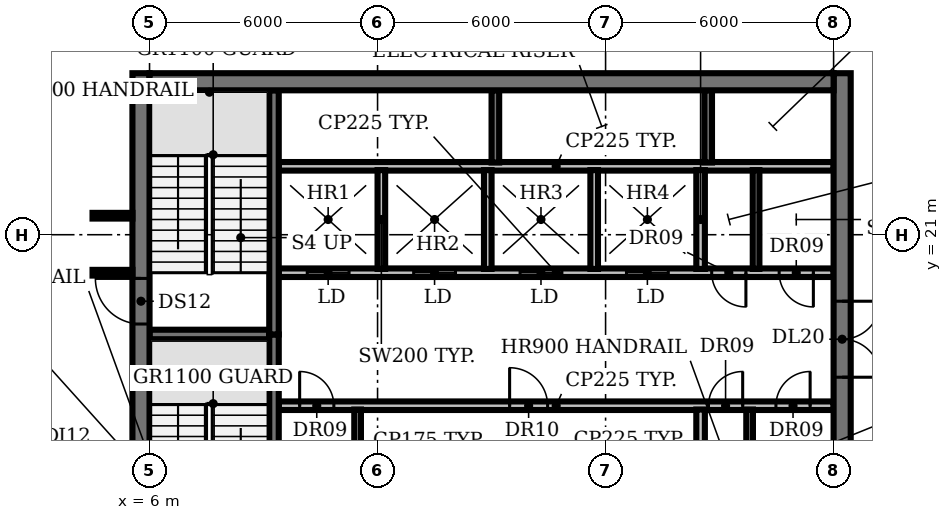
"""IFC4 building model, lengths in metres.
Left out: names, types, materials, properties, quantities, classifications, styles, units other than length and angle.
Written with IfcOpenShell. Run it as: python <this file> out.ifc"""

import sys

from ifc_helpers import new_model, si_unit, direction, frame, frame_2d, origin, place, context, subcontext, project, spatial, rectangle, extrude, element, fill, save


model = new_model("IFC4")
c1 = context("Model", 3, precision=1e-05, world=origin(), true_north=direction((0.0, 1.0)))
c2 = subcontext(c1, "Body", "Model", "MODEL_VIEW")
j1 = project(units=[si_unit("LENGTHUNIT", "METRE"), si_unit("PLANEANGLEUNIT", "RADIAN")], contexts=[c1])
p1 = place(None, origin())
s1 = spatial("IfcSite", under=j1, at=p1, CompositionType="ELEMENT")
p2 = place(p1, origin())
s2 = spatial("IfcBuilding", under=s1, at=p2, CompositionType="ELEMENT")
p3 = place(p2, frame((0.0, 0.0, 213.8)))
s3 = spatial("IfcBuildingStorey", under=s2, at=p3, CompositionType="ELEMENT", Elevation=213.8)
p4 = place(p3, frame((9.4, 16.5, 0.0), z_axis=(0.0, 0.0, 1.0), x_axis=(1.0, 0.0, 0.0)))
e1 = element("IfcWall", 1, at=p4, inside=s3, PredefinedType="PARTITIONING", context=c2, shape_type="SweptSolid", body=[
    extrude(rectangle(XDim=14.6, YDim=0.225, at=frame_2d((7.3, 0.0))), origin(), (0.0, 0.0, 1.0), 3.85),
])
p5 = place(p4, frame((0.55, 0.0, 0.0)))
e2 = element("IfcOpeningElement", 2, at=p5, cuts=e1, PredefinedType="OPENING", context=c2, shape_type="SweptSolid", body=[
    extrude(rectangle(XDim=0.9, YDim=2.1, at=frame_2d((0.45, 1.05))), frame((0.0, 0.123, 0.0), z_axis=(0.0, -1.0, 0.0), x_axis=(1.0, 0.0, 0.0)), (0.0, 0.0, 1.0), 0.245),
])
p6 = place(p4, frame((6.075, 0.0, 0.0)))
e3 = element("IfcOpeningElement", 3, at=p6, cuts=e1, PredefinedType="OPENING", context=c2, shape_type="SweptSolid", body=[
    extrude(rectangle(XDim=1.0, YDim=2.1, at=frame_2d((0.5, 1.05))), frame((0.0, 0.123, 0.0), z_axis=(0.0, -1.0, 0.0), x_axis=(1.0, 0.0, 0.0)), (0.0, 0.0, 1.0), 0.245),
])
p7 = place(p4, frame((11.308, 0.0, 0.0)))
e4 = element("IfcOpeningElement", 4, at=p7, cuts=e1, PredefinedType="OPENING", context=c2, shape_type="SweptSolid", body=[
    extrude(rectangle(XDim=0.9, YDim=2.1, at=frame_2d((0.45, 1.05))), frame((0.0, 0.123, 0.0), z_axis=(0.0, -1.0, 0.0), x_axis=(1.0, 0.0, 0.0)), (0.0, 0.0, 1.0), 0.245),
])
p8 = place(p4, frame((13.083, 0.0, 0.0)))
e5 = element("IfcOpeningElement", 5, at=p8, cuts=e1, PredefinedType="OPENING", context=c2, shape_type="SweptSolid", body=[
    extrude(rectangle(XDim=0.9, YDim=2.1, at=frame_2d((0.45, 1.05))), frame((0.0, 0.123, 0.0), z_axis=(0.0, -1.0, 0.0), x_axis=(1.0, 0.0, 0.0)), (0.0, 0.0, 1.0), 0.245),
])
p9 = place(p3, frame((6.0, 18.375, 0.0), z_axis=(0.0, 0.0, 1.0), x_axis=(1.0, 0.0, 0.0)))
e6 = element("IfcWall", 6, at=p9, inside=s3, PredefinedType="SHEAR", context=c2, shape_type="SweptSolid", body=[
    extrude(rectangle(XDim=3.15, YDim=0.25, at=frame_2d((1.575, 0.0))), origin(), (0.0, 0.0, 1.0), 3.85),
])
p10 = place(p3, frame((24.0, 20.0, 0.0), z_axis=(0.0, 0.0, 1.0), x_axis=(-1.0, 0.0, 0.0)))
e7 = element("IfcWall", 7, at=p10, inside=s3, PredefinedType="PARTITIONING", context=c2, shape_type="SweptSolid", body=[
    extrude(rectangle(XDim=14.6, YDim=0.225, at=frame_2d((7.3, 0.0))), origin(), (0.0, 0.0, 1.0), 3.85),
])
p11 = place(p10, frame((12.75, 0.0, 0.0)))
e8 = element("IfcOpeningElement", 8, at=p11, cuts=e7, PredefinedType="OPENING", context=c2, shape_type="SweptSolid", body=[
    extrude(rectangle(XDim=1.1, YDim=2.1, at=frame_2d((0.55, 1.05))), frame((0.0, 0.123, 0.0), z_axis=(0.0, -1.0, 0.0), x_axis=(1.0, 0.0, 0.0)), (0.0, 0.0, 1.0), 0.245),
])
p12 = place(p10, frame((9.95, 0.0, 0.0)))
e9 = element("IfcOpeningElement", 9, at=p12, cuts=e7, PredefinedType="OPENING", context=c2, shape_type="SweptSolid", body=[
    extrude(rectangle(XDim=1.1, YDim=2.1, at=frame_2d((0.55, 1.05))), frame((0.0, 0.123, 0.0), z_axis=(0.0, -1.0, 0.0), x_axis=(1.0, 0.0, 0.0)), (0.0, 0.0, 1.0), 0.245),
])
p13 = place(p10, frame((7.15, 0.0, 0.0)))
e10 = element("IfcOpeningElement", 10, at=p13, cuts=e7, PredefinedType="OPENING", context=c2, shape_type="SweptSolid", body=[
    extrude(rectangle(XDim=1.1, YDim=2.1, at=frame_2d((0.55, 1.05))), frame((0.0, 0.123, 0.0), z_axis=(0.0, -1.0, 0.0), x_axis=(1.0, 0.0, 0.0)), (0.0, 0.0, 1.0), 0.245),
])
p14 = place(p10, frame((4.35, 0.0, 0.0)))
e11 = element("IfcOpeningElement", 11, at=p14, cuts=e7, PredefinedType="OPENING", context=c2, shape_type="SweptSolid", body=[
    extrude(rectangle(XDim=1.1, YDim=2.1, at=frame_2d((0.55, 1.05))), frame((0.0, 0.123, 0.0), z_axis=(0.0, -1.0, 0.0), x_axis=(1.0, 0.0, 0.0)), (0.0, 0.0, 1.0), 0.245),
])
p15 = place(p10, frame((2.308, 0.0, 0.0)))
e12 = element("IfcOpeningElement", 12, at=p15, cuts=e7, PredefinedType="OPENING", context=c2, shape_type="SweptSolid", body=[
    extrude(rectangle(XDim=0.9, YDim=2.1, at=frame_2d((0.45, 1.05))), frame((0.0, 0.123, 0.0), z_axis=(0.0, -1.0, 0.0), x_axis=(1.0, 0.0, 0.0)), (0.0, 0.0, 1.0), 0.245),
])
p16 = place(p10, frame((0.532, 0.0, 0.0)))
e13 = element("IfcOpeningElement", 13, at=p16, cuts=e7, PredefinedType="OPENING", context=c2, shape_type="SweptSolid", body=[
    extrude(rectangle(XDim=0.9, YDim=2.1, at=frame_2d((0.45, 1.05))), frame((0.0, 0.123, 0.0), z_axis=(0.0, -1.0, 0.0), x_axis=(1.0, 0.0, 0.0)), (0.0, 0.0, 1.0), 0.245),
])
p17 = place(p3, frame((9.4, 22.8, 0.0), z_axis=(0.0, 0.0, 1.0), x_axis=(1.0, 0.0, 0.0)))
e14 = element("IfcWall", 14, at=p17, inside=s3, PredefinedType="PARTITIONING", context=c2, shape_type="SweptSolid", body=[
    extrude(rectangle(XDim=14.6, YDim=0.225, at=frame_2d((7.3, 0.0))), origin(), (0.0, 0.0, 1.0), 3.85),
])
p18 = place(p3, frame((9.275, 18.375, 0.0), z_axis=(0.0, 0.0, 1.0), x_axis=(0.0, -1.0, 0.0)))
e15 = element("IfcWall", 15, at=p18, inside=s3, PredefinedType="SHEAR", context=c2, shape_type="SweptSolid", body=[
    extrude(rectangle(XDim=6.55, YDim=0.25, at=frame_2d((3.275, 0.0))), origin(), (0.0, 0.0, 1.0), 3.85),
])
p19 = place(p18, frame((5.075, 0.0, 0.0)))
e16 = element("IfcOpeningElement", 16, at=p19, cuts=e15, PredefinedType="OPENING", context=c2, shape_type="SweptSolid", body=[
    extrude(rectangle(XDim=1.0, YDim=2.1, at=frame_2d((0.5, 1.05))), frame((0.0, 0.135, 0.0), z_axis=(0.0, -1.0, 0.0), x_axis=(1.0, 0.0, 0.0)), (0.0, 0.0, 1.0), 0.27),
])
p20 = place(p3, frame((9.275, 18.375, 0.0), z_axis=(0.0, 0.0, 1.0), x_axis=(0.0, 1.0, 0.0)))
e17 = element("IfcWall", 17, at=p20, inside=s3, PredefinedType="SHEAR", context=c2, shape_type="SweptSolid", body=[
    extrude(rectangle(XDim=6.425, YDim=0.25, at=frame_2d((3.212, 0.0))), origin(), (0.0, 0.0, 1.0), 3.85),
])
p21 = place(p3, frame((11.475, 13.8, 0.0), z_axis=(0.0, 0.0, 1.0), x_axis=(0.0, 1.0, 0.0)))
e18 = element("IfcWall", 18, at=p21, inside=s3, PredefinedType="PARTITIONING", context=c2, shape_type="SweptSolid", body=[
    extrude(rectangle(XDim=2.6, YDim=0.175, at=frame_2d((1.3, 0.0))), origin(), (0.0, 0.0, 1.0), 3.85),
])
for number, where, z_axis, x_axis in (
    (19, (12.1, 20.1, 0.0), (0.0, 0.0, 1.0), (0.0, 1.0, 0.0)),
    (20, (14.9, 20.1, 0.0), (0.0, 0.0, 1.0), (0.0, 1.0, 0.0)),
):
    element("IfcWall", number, at=place(p3, frame(where, z_axis=z_axis, x_axis=x_axis)), inside=s3, PredefinedType="SOLIDWALL", context=c2, shape_type="SweptSolid", body=[
        extrude(rectangle(XDim=2.6, YDim=0.2, at=frame_2d((1.3, 0.0))), origin(), (0.0, 0.0, 1.0), 3.85),
    ])
p22 = place(p3, frame((15.1, 22.9, 0.0), z_axis=(0.0, 0.0, 1.0), x_axis=(0.0, 1.0, 0.0)))
e21 = element("IfcWall", 21, at=p22, inside=s3, PredefinedType="SHEAR", context=c2, shape_type="SweptSolid", body=[
    extrude(rectangle(XDim=1.9, YDim=0.2, at=frame_2d((0.95, 0.0))), origin(), (0.0, 0.0, 1.0), 3.85),
])
p23 = place(p3, frame((17.7, 20.1, 0.0), z_axis=(0.0, 0.0, 1.0), x_axis=(0.0, 1.0, 0.0)))
e22 = element("IfcWall", 22, at=p23, inside=s3, PredefinedType="SOLIDWALL", context=c2, shape_type="SweptSolid", body=[
    extrude(rectangle(XDim=2.6, YDim=0.2, at=frame_2d((1.3, 0.0))), origin(), (0.0, 0.0, 1.0), 3.85),
])
for number, where, z_axis, x_axis in (
    (23, (20.5, 13.8, 0.0), (0.0, 0.0, 1.0), (0.0, 1.0, 0.0)),
    (24, (20.5, 20.1, 0.0), (0.0, 0.0, 1.0), (0.0, 1.0, 0.0)),
):
    element("IfcWall", number, at=place(p3, frame(where, z_axis=z_axis, x_axis=x_axis)), inside=s3, PredefinedType="PARTITIONING", context=c2, shape_type="SweptSolid", body=[
        extrude(rectangle(XDim=2.6, YDim=0.225, at=frame_2d((1.3, 0.0))), origin(), (0.0, 0.0, 1.0), 3.85),
    ])
p24 = place(p3, frame((20.7, 22.9, 0.0), z_axis=(0.0, 0.0, 1.0), x_axis=(0.0, 1.0, 0.0)))
e25 = element("IfcWall", 25, at=p24, inside=s3, PredefinedType="SHEAR", context=c2, shape_type="SweptSolid", body=[
    extrude(rectangle(XDim=1.9, YDim=0.2, at=frame_2d((0.95, 0.0))), origin(), (0.0, 0.0, 1.0), 3.85),
])
for number, where, z_axis, x_axis in (
    (26, (21.79, 13.8, 0.0), (0.0, 0.0, 1.0), (0.0, 1.0, 0.0)),
    (27, (21.96, 20.1, 0.0), (0.0, 0.0, 1.0), (0.0, 1.0, 0.0)),
):
    element("IfcWall", number, at=place(p3, frame(where, z_axis=z_axis, x_axis=x_axis)), inside=s3, PredefinedType="PARTITIONING", context=c2, shape_type="SweptSolid", body=[
        extrude(rectangle(XDim=2.6, YDim=0.175, at=frame_2d((1.3, 0.0))), origin(), (0.0, 0.0, 1.0), 3.85),
    ])
p25 = place(p3, frame((5.775, 4.42, 0.0), z_axis=(0.0, 0.0, 1.0), x_axis=(0.0, 1.0, 0.0)))
e28 = element("IfcWall", 28, at=p25, inside=s3, PredefinedType="SHEAR", context=c2, shape_type="SweptSolid", body=[
    extrude(rectangle(XDim=20.83, YDim=0.45, at=frame_2d((10.415, 0.0))), origin(), (0.0, 0.0, 1.0), 3.85),
])
p26 = place(p25, frame((1.23, 0.0, 0.0)))
e29 = element("IfcOpeningElement", 29, at=p26, cuts=e28, PredefinedType="OPENING", context=c2, shape_type="SweptSolid", body=[
    extrude(rectangle(XDim=1.5, YDim=2.1, at=frame_2d((0.75, 1.05))), frame((0.0, 0.235, 0.0), z_axis=(0.0, -1.0, 0.0), x_axis=(1.0, 0.0, 0.0)), (0.0, 0.0, 1.0), 0.47),
])
p27 = place(p25, frame((7.68, 0.0, 0.0)))
e30 = element("IfcOpeningElement", 30, at=p27, cuts=e28, PredefinedType="OPENING", context=c2, shape_type="SweptSolid", body=[
    extrude(rectangle(XDim=1.2, YDim=2.1, at=frame_2d((0.6, 1.05))), frame((0.0, 0.235, 0.0), z_axis=(0.0, -1.0, 0.0), x_axis=(1.0, 0.0, 0.0)), (0.0, 0.0, 1.0), 0.47),
])
p28 = place(p25, frame((14.23, 0.0, 0.0)))
e31 = element("IfcOpeningElement", 31, at=p28, cuts=e28, PredefinedType="OPENING", context=c2, shape_type="SweptSolid", body=[
    extrude(rectangle(XDim=1.2, YDim=2.1, at=frame_2d((0.6, 1.05))), frame((0.0, 0.235, 0.0), z_axis=(0.0, -1.0, 0.0), x_axis=(1.0, 0.0, 0.0)), (0.0, 0.0, 1.0), 0.47),
])
p29 = place(p3, frame((24.225, 25.25, 0.0), z_axis=(0.0, 0.0, 1.0), x_axis=(0.0, -1.0, 0.0)))
e32 = element("IfcWall", 32, at=p29, inside=s3, PredefinedType="SHEAR", context=c2, shape_type="SweptSolid", body=[
    extrude(rectangle(XDim=20.83, YDim=0.45, at=frame_2d((10.415, 0.0))), origin(), (0.0, 0.0, 1.0), 3.85),
])
p30 = place(p29, frame((18.1, 0.0, 0.0)))
e33 = element("IfcOpeningElement", 33, at=p30, cuts=e32, PredefinedType="OPENING", context=c2, shape_type="SweptSolid", body=[
    extrude(rectangle(XDim=1.5, YDim=2.1, at=frame_2d((0.75, 1.05))), frame((0.0, 0.235, 0.0), z_axis=(0.0, -1.0, 0.0), x_axis=(1.0, 0.0, 0.0)), (0.0, 0.0, 1.0), 0.47),
])
p31 = place(p29, frame((12.0, 0.0, 0.0)))
e34 = element("IfcOpeningElement", 34, at=p31, cuts=e32, PredefinedType="OPENING", context=c2, shape_type="SweptSolid", body=[
    extrude(rectangle(XDim=0.9, YDim=2.1, at=frame_2d((0.45, 1.05))), frame((0.0, 0.235, 0.0), z_axis=(0.0, -1.0, 0.0), x_axis=(1.0, 0.0, 0.0)), (0.0, 0.0, 1.0), 0.47),
])
p32 = place(p29, frame((6.0, 0.0, 0.0)))
e35 = element("IfcOpeningElement", 35, at=p32, cuts=e32, PredefinedType="OPENING", context=c2, shape_type="SweptSolid", body=[
    extrude(rectangle(XDim=2.0, YDim=2.1, at=frame_2d((1.0, 1.05))), frame((0.0, 0.235, 0.0), z_axis=(0.0, -1.0, 0.0), x_axis=(1.0, 0.0, 0.0)), (0.0, 0.0, 1.0), 0.47),
])
p33 = place(p3, frame((6.0, 25.025, 0.0), z_axis=(0.0, 0.0, 1.0), x_axis=(1.0, 0.0, 0.0)))
e36 = element("IfcWall", 36, at=p33, inside=s3, PredefinedType="SHEAR", context=c2, shape_type="SweptSolid", body=[
    extrude(rectangle(XDim=18.0, YDim=0.45, at=frame_2d((9.0, 0.0))), origin(), (0.0, 0.0, 1.0), 3.85),
])
for number, where, z_axis, x_axis in (
    (37, (4.5, 20.0, 0.0), (0.0, 0.0, 1.0), (1.0, 0.0, 0.0)),
    (38, (4.5, 21.5, 0.0), (0.0, 0.0, 1.0), (1.0, 0.0, 0.0)),
):
    element("IfcWall", number, at=place(p3, frame(where, z_axis=z_axis, x_axis=x_axis)), inside=s3, PredefinedType="PARTITIONING", context=c2, shape_type="SweptSolid", body=[
        extrude(rectangle(XDim=1.05, YDim=0.15, at=frame_2d((0.525, 0.0))), origin(), (0.0, 0.0, 1.0), 2.88),
    ])
p34 = place(p5, origin())
e39 = element("IfcDoor", 39, at=p34, inside=s3, OperationType="SINGLE_SWING_LEFT", PredefinedType="DOOR", context=c2, shape_type="SweptSolid", body=[
    extrude(rectangle(XDim=0.9, YDim=2.1, at=frame_2d((0.45, 1.05))), frame((0.0, 0.025, 0.0), z_axis=(0.0, -1.0, 0.0), x_axis=(1.0, 0.0, 0.0)), (0.0, 0.0, 1.0), 0.05),
])
fill(e2, e39)
p35 = place(p6, origin())
e40 = element("IfcDoor", 40, at=p35, inside=s3, OperationType="SINGLE_SWING_LEFT", PredefinedType="DOOR", context=c2, shape_type="SweptSolid", body=[
    extrude(rectangle(XDim=1.0, YDim=2.1, at=frame_2d((0.5, 1.05))), frame((0.0, 0.025, 0.0), z_axis=(0.0, -1.0, 0.0), x_axis=(1.0, 0.0, 0.0)), (0.0, 0.0, 1.0), 0.05),
])
fill(e3, e40)
p36 = place(p7, origin())
e41 = element("IfcDoor", 41, at=p36, inside=s3, OperationType="SINGLE_SWING_RIGHT", PredefinedType="DOOR", context=c2, shape_type="SweptSolid", body=[
    extrude(rectangle(XDim=0.9, YDim=2.1, at=frame_2d((0.45, 1.05))), frame((0.0, 0.025, 0.0), z_axis=(0.0, -1.0, 0.0), x_axis=(1.0, 0.0, 0.0)), (0.0, 0.0, 1.0), 0.05),
])
fill(e4, e41)
p37 = place(p8, origin())
e42 = element("IfcDoor", 42, at=p37, inside=s3, OperationType="SINGLE_SWING_RIGHT", PredefinedType="DOOR", context=c2, shape_type="SweptSolid", body=[
    extrude(rectangle(XDim=0.9, YDim=2.1, at=frame_2d((0.45, 1.05))), frame((0.0, 0.025, 0.0), z_axis=(0.0, -1.0, 0.0), x_axis=(1.0, 0.0, 0.0)), (0.0, 0.0, 1.0), 0.05),
])
fill(e5, e42)
p38 = place(p11, origin())
e43 = element("IfcDoor", 43, at=p38, inside=s3, OperationType="DOUBLE_DOOR_SLIDING", PredefinedType="DOOR", context=c2, shape_type="SweptSolid", body=[
    extrude(rectangle(XDim=1.1, YDim=2.1, at=frame_2d((0.55, 1.05))), frame((0.0, 0.025, 0.0), z_axis=(0.0, -1.0, 0.0), x_axis=(1.0, 0.0, 0.0)), (0.0, 0.0, 1.0), 0.05),
])
fill(e8, e43)
p39 = place(p12, origin())
e44 = element("IfcDoor", 44, at=p39, inside=s3, OperationType="DOUBLE_DOOR_SLIDING", PredefinedType="DOOR", context=c2, shape_type="SweptSolid", body=[
    extrude(rectangle(XDim=1.1, YDim=2.1, at=frame_2d((0.55, 1.05))), frame((0.0, 0.025, 0.0), z_axis=(0.0, -1.0, 0.0), x_axis=(1.0, 0.0, 0.0)), (0.0, 0.0, 1.0), 0.05),
])
fill(e9, e44)
p40 = place(p13, origin())
e45 = element("IfcDoor", 45, at=p40, inside=s3, OperationType="DOUBLE_DOOR_SLIDING", PredefinedType="DOOR", context=c2, shape_type="SweptSolid", body=[
    extrude(rectangle(XDim=1.1, YDim=2.1, at=frame_2d((0.55, 1.05))), frame((0.0, 0.025, 0.0), z_axis=(0.0, -1.0, 0.0), x_axis=(1.0, 0.0, 0.0)), (0.0, 0.0, 1.0), 0.05),
])
fill(e10, e45)
p41 = place(p14, origin())
e46 = element("IfcDoor", 46, at=p41, inside=s3, OperationType="DOUBLE_DOOR_SLIDING", PredefinedType="DOOR", context=c2, shape_type="SweptSolid", body=[
    extrude(rectangle(XDim=1.1, YDim=2.1, at=frame_2d((0.55, 1.05))), frame((0.0, 0.025, 0.0), z_axis=(0.0, -1.0, 0.0), x_axis=(1.0, 0.0, 0.0)), (0.0, 0.0, 1.0), 0.05),
])
fill(e11, e46)
p42 = place(p15, origin())
e47 = element("IfcDoor", 47, at=p42, inside=s3, OperationType="SINGLE_SWING_LEFT", PredefinedType="DOOR", context=c2, shape_type="SweptSolid", body=[
    extrude(rectangle(XDim=0.9, YDim=2.1, at=frame_2d((0.45, 1.05))), frame((0.0, 0.025, 0.0), z_axis=(0.0, -1.0, 0.0), x_axis=(1.0, 0.0, 0.0)), (0.0, 0.0, 1.0), 0.05),
])
fill(e12, e47)
p43 = place(p16, origin())
e48 = element("IfcDoor", 48, at=p43, inside=s3, OperationType="SINGLE_SWING_LEFT", PredefinedType="DOOR", context=c2, shape_type="SweptSolid", body=[
    extrude(rectangle(XDim=0.9, YDim=2.1, at=frame_2d((0.45, 1.05))), frame((0.0, 0.025, 0.0), z_axis=(0.0, -1.0, 0.0), x_axis=(1.0, 0.0, 0.0)), (0.0, 0.0, 1.0), 0.05),
])
fill(e13, e48)
p44 = place(p28, origin())
e49 = element("IfcDoor", 49, at=p44, inside=s3, OperationType="SINGLE_SWING_RIGHT", PredefinedType="DOOR", context=c2, shape_type="SweptSolid", body=[
    extrude(rectangle(XDim=1.2, YDim=2.1, at=frame_2d((0.6, 1.05))), frame((0.0, 0.025, 0.0), z_axis=(0.0, -1.0, 0.0), x_axis=(1.0, 0.0, 0.0)), (0.0, 0.0, 1.0), 0.05),
])
fill(e31, e49)
p45 = place(p32, origin())
e50 = element("IfcDoor", 50, at=p45, inside=s3, OperationType="DOUBLE_DOOR_SINGLE_SWING", PredefinedType="DOOR", context=c2, shape_type="SweptSolid", body=[
    extrude(rectangle(XDim=2.0, YDim=2.1, at=frame_2d((1.0, 1.05))), frame((0.0, 0.025, 0.0), z_axis=(0.0, -1.0, 0.0), x_axis=(1.0, 0.0, 0.0)), (0.0, 0.0, 1.0), 0.05),
])
fill(e35, e50)
save(model, sys.argv[1])
